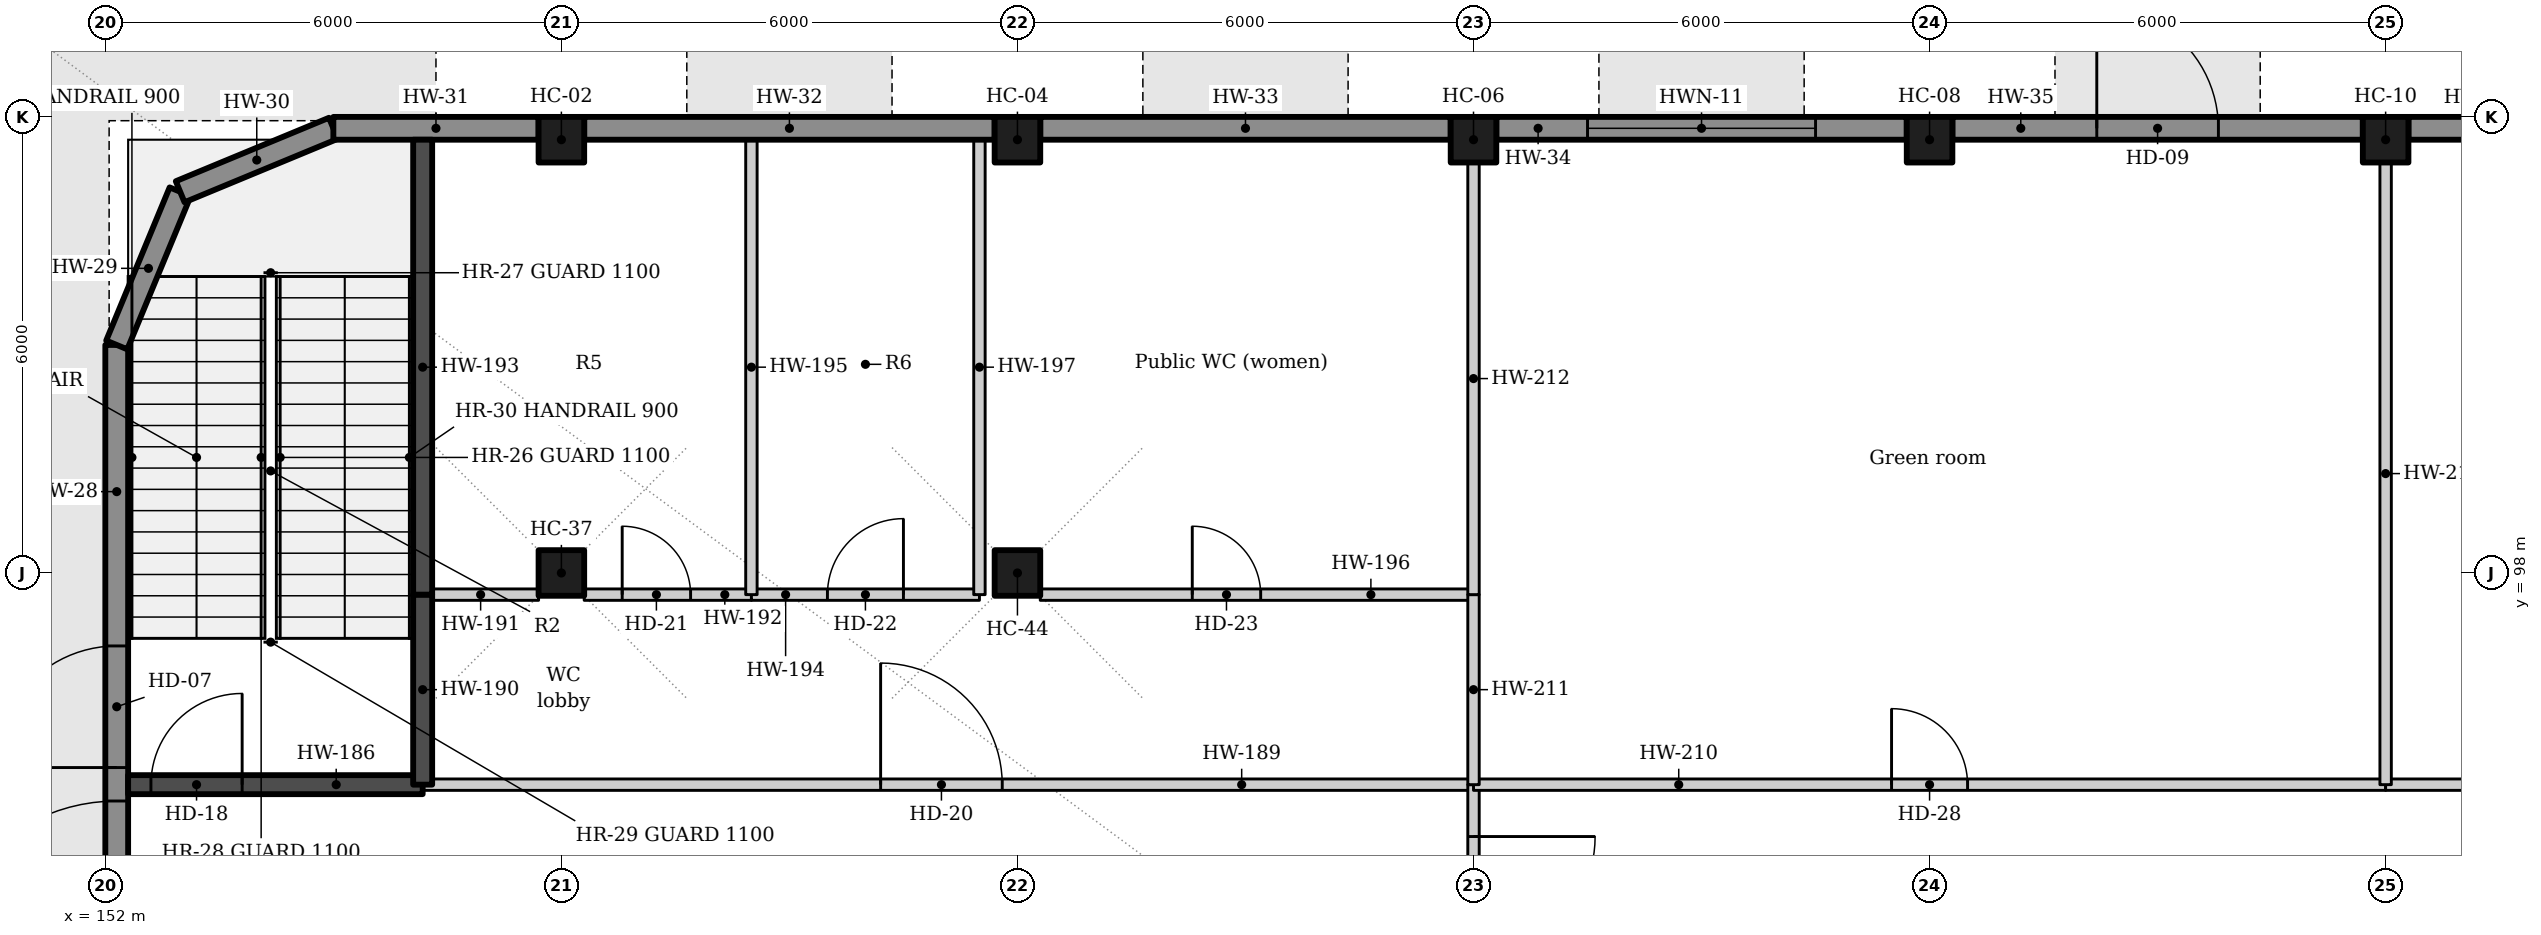
"""IFC4 building model, lengths in metres.
Left out: names, types, materials, properties, quantities, classifications, styles, units other than length and angle.
Written with IfcOpenShell. Run it as: python <this file> out.ifc"""

import sys

from ifc_helpers import new_model, si_unit, direction, frame, frame_2d, origin, origin_2d, place, context, subcontext, project, spatial, rectangle, extrude, element, fill, save


model = new_model("IFC4")
c1 = context("Model", 3, precision=1e-05, world=origin(), true_north=direction((0.0, 1.0)))
c2 = subcontext(c1, "Body", "Model", "MODEL_VIEW")
j1 = project(units=[si_unit("LENGTHUNIT", "METRE"), si_unit("PLANEANGLEUNIT", "RADIAN")], contexts=[c1])
p1 = place(None, origin())
s1 = spatial("IfcSite", under=j1, at=p1, CompositionType="ELEMENT")
p2 = place(p1, origin())
s2 = spatial("IfcBuilding", under=s1, at=p2, CompositionType="ELEMENT")
p3 = place(p2, origin())
s3 = spatial("IfcBuildingStorey", under=s2, at=p3, CompositionType="ELEMENT", Elevation=0.0)
for number, where, z_axis, x_axis in (
    (1, (158.0, 103.7, 0.0), (0.0, 0.0, 1.0), (1.0, 0.0, 0.0)),
    (2, (164.0, 103.7, 0.0), (0.0, 0.0, 1.0), (1.0, 0.0, 0.0)),
    (3, (170.0, 103.7, 0.0), (0.0, 0.0, 1.0), (1.0, 0.0, 0.0)),
    (4, (176.0, 103.7, 0.0), (0.0, 0.0, 1.0), (1.0, 0.0, 0.0)),
    (5, (182.0, 103.7, 0.0), (0.0, 0.0, 1.0), (1.0, 0.0, 0.0)),
    (6, (158.0, 98.0, 0.0), (0.0, 0.0, 1.0), (1.0, 0.0, 0.0)),
    (7, (164.0, 98.0, 0.0), (0.0, 0.0, 1.0), (1.0, 0.0, 0.0)),
):
    element("IfcColumn", number, at=place(p3, frame(where, z_axis=z_axis, x_axis=x_axis)), inside=s3, PredefinedType="COLUMN", context=c2, shape_type="SweptSolid", body=[
        extrude(rectangle(XDim=0.6, YDim=0.6, at=origin_2d()), origin(), (0.0, 0.0, 1.0), 6.6),
    ])
p4 = place(p3, frame((152.15, 92.3, 0.0), z_axis=(0.0, 0.0, 1.0), x_axis=(0.0, 1.0, 0.0)))
e8 = element("IfcWall", 8, at=p4, inside=s3, PredefinedType="SOLIDWALL", context=c2, shape_type="SweptSolid", body=[
    extrude(rectangle(XDim=8.7, YDim=0.3, at=frame_2d((4.35, 0.0))), origin(), (0.0, 0.0, 1.0), 6.6),
])
p5 = place(p4, frame((3.14, 0.0, 0.0)))
e9 = element("IfcOpeningElement", 9, at=p5, cuts=e8, PredefinedType="OPENING", context=c2, shape_type="SweptSolid", body=[
    extrude(rectangle(XDim=1.6, YDim=2.4, at=frame_2d((0.8, 1.2))), frame((0.0, 0.16, 0.0), z_axis=(0.0, -1.0, 0.0), x_axis=(1.0, 0.0, 0.0)), (0.0, 0.0, 1.0), 0.32),
])
p6 = place(p4, frame((0.3, 0.0, 0.0)))
e10 = element("IfcOpeningElement", 10, at=p6, cuts=e8, PredefinedType="OPENING", context=c2, shape_type="SweptSolid", body=[
    extrude(rectangle(XDim=2.4, YDim=2.5, at=frame_2d((1.2, 1.25))), frame((0.0, 0.16, 0.0), z_axis=(0.0, -1.0, 0.0), x_axis=(1.0, 0.0, 0.0)), (0.0, 0.0, 1.0), 0.32),
])
for number, where, z_axis, x_axis in (
    (11, (152.15, 101.0, 0.0), (0.0, 0.0, 1.0), (0.383, 0.924, 0.0)),
    (12, (152.985, 103.015, 0.0), (0.0, 0.0, 1.0), (0.924, 0.383, 0.0)),
):
    element("IfcWall", number, at=place(p3, frame(where, z_axis=z_axis, x_axis=x_axis)), inside=s3, PredefinedType="SOLIDWALL", context=c2, shape_type="SweptSolid", body=[
        extrude(rectangle(XDim=2.181, YDim=0.3, at=frame_2d((1.091, 0.0))), origin(), (0.0, 0.0, 1.0), 6.6),
    ])
p7 = place(p3, frame((155.0, 103.85, 0.0), z_axis=(0.0, 0.0, 1.0), x_axis=(1.0, 0.0, 0.0)))
e13 = element("IfcWall", 13, at=p7, inside=s3, PredefinedType="SOLIDWALL", context=c2, shape_type="SweptSolid", body=[
    extrude(rectangle(XDim=2.7, YDim=0.3, at=frame_2d((1.35, 0.0))), origin(), (0.0, 0.0, 1.0), 6.6),
])
for number, where, z_axis, x_axis in (
    (14, (158.3, 103.85, 0.0), (0.0, 0.0, 1.0), (1.0, 0.0, 0.0)),
    (15, (164.3, 103.85, 0.0), (0.0, 0.0, 1.0), (1.0, 0.0, 0.0)),
):
    element("IfcWall", number, at=place(p3, frame(where, z_axis=z_axis, x_axis=x_axis)), inside=s3, PredefinedType="SOLIDWALL", context=c2, shape_type="SweptSolid", body=[
        extrude(rectangle(XDim=5.4, YDim=0.3, at=frame_2d((2.7, 0.0))), origin(), (0.0, 0.0, 1.0), 6.6),
    ])
p8 = place(p3, frame((170.3, 103.85, 0.0), z_axis=(0.0, 0.0, 1.0), x_axis=(1.0, 0.0, 0.0)))
e16 = element("IfcWall", 16, at=p8, inside=s3, PredefinedType="SOLIDWALL", context=c2, shape_type="SweptSolid", body=[
    extrude(rectangle(XDim=5.4, YDim=0.3, at=frame_2d((2.7, 0.0))), origin(), (0.0, 0.0, 1.0), 6.6),
])
p9 = place(p8, frame((1.2, 0.0, 0.9)))
e17 = element("IfcOpeningElement", 17, at=p9, cuts=e16, PredefinedType="OPENING", context=c2, shape_type="SweptSolid", body=[
    extrude(rectangle(XDim=3.0, YDim=1.8, at=frame_2d((1.5, 0.9))), frame((0.0, 0.16, 0.0), z_axis=(0.0, -1.0, 0.0), x_axis=(1.0, 0.0, 0.0)), (0.0, 0.0, 1.0), 0.32),
])
p10 = place(p3, frame((176.3, 103.85, 0.0), z_axis=(0.0, 0.0, 1.0), x_axis=(1.0, 0.0, 0.0)))
e18 = element("IfcWall", 18, at=p10, inside=s3, PredefinedType="SOLIDWALL", context=c2, shape_type="SweptSolid", body=[
    extrude(rectangle(XDim=5.4, YDim=0.3, at=frame_2d((2.7, 0.0))), origin(), (0.0, 0.0, 1.0), 6.6),
])
p11 = place(p10, frame((1.9, 0.0, 0.0)))
e19 = element("IfcOpeningElement", 19, at=p11, cuts=e18, PredefinedType="OPENING", context=c2, shape_type="SweptSolid", body=[
    extrude(rectangle(XDim=1.6, YDim=2.4, at=frame_2d((0.8, 1.2))), frame((0.0, 0.16, 0.0), z_axis=(0.0, -1.0, 0.0), x_axis=(1.0, 0.0, 0.0)), (0.0, 0.0, 1.0), 0.32),
])
p12 = place(p3, frame((182.3, 103.85, 0.0), z_axis=(0.0, 0.0, 1.0), x_axis=(1.0, 0.0, 0.0)))
e20 = element("IfcWall", 20, at=p12, inside=s3, PredefinedType="SOLIDWALL", context=c2, shape_type="SweptSolid", body=[
    extrude(rectangle(XDim=5.4, YDim=0.3, at=frame_2d((2.7, 0.0))), origin(), (0.0, 0.0, 1.0), 6.6),
])
p13 = place(p12, frame((1.9, 0.0, 0.0)))
e21 = element("IfcOpeningElement", 21, at=p13, cuts=e20, PredefinedType="OPENING", context=c2, shape_type="SweptSolid", body=[
    extrude(rectangle(XDim=1.6, YDim=2.4, at=frame_2d((0.8, 1.2))), frame((0.0, 0.16, 0.0), z_axis=(0.0, -1.0, 0.0), x_axis=(1.0, 0.0, 0.0)), (0.0, 0.0, 1.0), 0.32),
])
p14 = place(p3, frame((152.3, 95.215, 0.0), z_axis=(0.0, 0.0, 1.0), x_axis=(1.0, 0.0, 0.0)))
e22 = element("IfcWall", 22, at=p14, inside=s3, PredefinedType="SOLIDWALL", context=c2, shape_type="SweptSolid", body=[
    extrude(rectangle(XDim=3.875, YDim=0.25, at=frame_2d((1.938, 0.0))), origin(), (0.0, 0.0, 1.0), 6.6),
])
p15 = place(p14, frame((0.3, 0.0, 0.0)))
e23 = element("IfcOpeningElement", 23, at=p15, cuts=e22, PredefinedType="OPENING", context=c2, shape_type="SweptSolid", body=[
    extrude(rectangle(XDim=1.2, YDim=2.1, at=frame_2d((0.6, 1.05))), frame((0.0, 0.135, 0.0), z_axis=(0.0, -1.0, 0.0), x_axis=(1.0, 0.0, 0.0)), (0.0, 0.0, 1.0), 0.27),
])
p16 = place(p3, frame((156.175, 95.215, 0.0), z_axis=(0.0, 0.0, 1.0), x_axis=(1.0, 0.0, 0.0)))
e24 = element("IfcWall", 24, at=p16, inside=s3, PredefinedType="PARTITIONING", context=c2, shape_type="SweptSolid", body=[
    extrude(rectangle(XDim=13.825, YDim=0.15, at=frame_2d((6.913, 0.0))), origin(), (0.0, 0.0, 1.0), 6.25),
])
p17 = place(p16, frame((6.025, 0.0, 0.0)))
e25 = element("IfcOpeningElement", 25, at=p17, cuts=e24, PredefinedType="OPENING", context=c2, shape_type="SweptSolid", body=[
    extrude(rectangle(XDim=1.6, YDim=2.1, at=frame_2d((0.8, 1.05))), frame((0.0, 0.085, 0.0), z_axis=(0.0, -1.0, 0.0), x_axis=(1.0, 0.0, 0.0)), (0.0, 0.0, 1.0), 0.17),
])
p18 = place(p3, frame((156.175, 97.715, 0.0), z_axis=(0.0, 0.0, 1.0), x_axis=(0.0, -1.0, 0.0)))
e26 = element("IfcWall", 26, at=p18, inside=s3, PredefinedType="SOLIDWALL", context=c2, shape_type="SweptSolid", body=[
    extrude(rectangle(XDim=2.5, YDim=0.25, at=frame_2d((1.25, 0.0))), origin(), (0.0, 0.0, 1.0), 6.6),
])
p19 = place(p3, frame((156.175, 97.715, 0.0), z_axis=(0.0, 0.0, 1.0), x_axis=(1.0, 0.0, 0.0)))
e27 = element("IfcWall", 27, at=p19, inside=s3, PredefinedType="PLUMBINGWALL", context=c2, shape_type="SweptSolid", body=[
    extrude(rectangle(XDim=1.525, YDim=0.15, at=frame_2d((0.762, 0.0))), origin(), (0.0, 0.0, 1.0), 6.25),
])
p20 = place(p3, frame((158.3, 97.715, 0.0), z_axis=(0.0, 0.0, 1.0), x_axis=(1.0, 0.0, 0.0)))
e28 = element("IfcWall", 28, at=p20, inside=s3, PredefinedType="PLUMBINGWALL", context=c2, shape_type="SweptSolid", body=[
    extrude(rectangle(XDim=2.2, YDim=0.15, at=frame_2d((1.1, 0.0))), origin(), (0.0, 0.0, 1.0), 6.25),
])
p21 = place(p20, frame((0.5, 0.0, 0.0)))
e29 = element("IfcOpeningElement", 29, at=p21, cuts=e28, PredefinedType="OPENING", context=c2, shape_type="SweptSolid", body=[
    extrude(rectangle(XDim=0.9, YDim=2.1, at=frame_2d((0.45, 1.05))), frame((0.0, 0.085, 0.0), z_axis=(0.0, -1.0, 0.0), x_axis=(1.0, 0.0, 0.0)), (0.0, 0.0, 1.0), 0.17),
])
p22 = place(p3, frame((156.175, 103.7, 0.0), z_axis=(0.0, 0.0, 1.0), x_axis=(0.0, -1.0, 0.0)))
e30 = element("IfcWall", 30, at=p22, inside=s3, PredefinedType="SOLIDWALL", context=c2, shape_type="SweptSolid", body=[
    extrude(rectangle(XDim=5.985, YDim=0.25, at=frame_2d((2.992, 0.0))), origin(), (0.0, 0.0, 1.0), 6.6),
])
p23 = place(p3, frame((160.5, 97.715, 0.0), z_axis=(0.0, 0.0, 1.0), x_axis=(1.0, 0.0, 0.0)))
e31 = element("IfcWall", 31, at=p23, inside=s3, PredefinedType="PLUMBINGWALL", context=c2, shape_type="SweptSolid", body=[
    extrude(rectangle(XDim=3.0, YDim=0.15, at=frame_2d((1.5, 0.0))), origin(), (0.0, 0.0, 1.0), 6.25),
])
p24 = place(p23, frame((1.0, 0.0, 0.0)))
e32 = element("IfcOpeningElement", 32, at=p24, cuts=e31, PredefinedType="OPENING", context=c2, shape_type="SweptSolid", body=[
    extrude(rectangle(XDim=1.0, YDim=2.1, at=frame_2d((0.5, 1.05))), frame((0.0, 0.085, 0.0), z_axis=(0.0, -1.0, 0.0), x_axis=(1.0, 0.0, 0.0)), (0.0, 0.0, 1.0), 0.17),
])
p25 = place(p3, frame((160.5, 103.7, 0.0), z_axis=(0.0, 0.0, 1.0), x_axis=(0.0, -1.0, 0.0)))
e33 = element("IfcWall", 33, at=p25, inside=s3, PredefinedType="PLUMBINGWALL", context=c2, shape_type="SweptSolid", body=[
    extrude(rectangle(XDim=5.985, YDim=0.15, at=frame_2d((2.992, 0.0))), origin(), (0.0, 0.0, 1.0), 6.25),
])
p26 = place(p3, frame((164.3, 97.715, 0.0), z_axis=(0.0, 0.0, 1.0), x_axis=(1.0, 0.0, 0.0)))
e34 = element("IfcWall", 34, at=p26, inside=s3, PredefinedType="PLUMBINGWALL", context=c2, shape_type="SweptSolid", body=[
    extrude(rectangle(XDim=5.7, YDim=0.15, at=frame_2d((2.85, 0.0))), origin(), (0.0, 0.0, 1.0), 6.25),
])
p27 = place(p26, frame((2.0, 0.0, 0.0)))
e35 = element("IfcOpeningElement", 35, at=p27, cuts=e34, PredefinedType="OPENING", context=c2, shape_type="SweptSolid", body=[
    extrude(rectangle(XDim=0.9, YDim=2.1, at=frame_2d((0.45, 1.05))), frame((0.0, 0.085, 0.0), z_axis=(0.0, -1.0, 0.0), x_axis=(1.0, 0.0, 0.0)), (0.0, 0.0, 1.0), 0.17),
])
p28 = place(p3, frame((163.5, 103.7, 0.0), z_axis=(0.0, 0.0, 1.0), x_axis=(0.0, -1.0, 0.0)))
e36 = element("IfcWall", 36, at=p28, inside=s3, PredefinedType="PLUMBINGWALL", context=c2, shape_type="SweptSolid", body=[
    extrude(rectangle(XDim=5.985, YDim=0.15, at=frame_2d((2.992, 0.0))), origin(), (0.0, 0.0, 1.0), 6.25),
])
p29 = place(p3, frame((170.0, 95.215, 0.0), z_axis=(0.0, 0.0, 1.0), x_axis=(0.0, -1.0, 0.0)))
e37 = element("IfcWall", 37, at=p29, inside=s3, PredefinedType="PARTITIONING", context=c2, shape_type="SweptSolid", body=[
    extrude(rectangle(XDim=2.965, YDim=0.15, at=frame_2d((1.482, 0.0))), origin(), (0.0, 0.0, 1.0), 6.25),
])
p30 = place(p29, frame((0.683, 0.0, 0.0)))
e38 = element("IfcOpeningElement", 38, at=p30, cuts=e37, PredefinedType="OPENING", context=c2, shape_type="SweptSolid", body=[
    extrude(rectangle(XDim=1.6, YDim=2.1, at=frame_2d((0.8, 1.05))), frame((0.0, 0.085, 0.0), z_axis=(0.0, -1.0, 0.0), x_axis=(1.0, 0.0, 0.0)), (0.0, 0.0, 1.0), 0.17),
])
p31 = place(p3, frame((170.0, 95.215, 0.0), z_axis=(0.0, 0.0, 1.0), x_axis=(1.0, 0.0, 0.0)))
e39 = element("IfcWall", 39, at=p31, inside=s3, PredefinedType="PARTITIONING", context=c2, shape_type="SweptSolid", body=[
    extrude(rectangle(XDim=12.0, YDim=0.15, at=frame_2d((6.0, 0.0))), origin(), (0.0, 0.0, 1.0), 6.25),
])
p32 = place(p31, frame((5.5, 0.0, 0.0)))
e40 = element("IfcOpeningElement", 40, at=p32, cuts=e39, PredefinedType="OPENING", context=c2, shape_type="SweptSolid", body=[
    extrude(rectangle(XDim=1.0, YDim=2.1, at=frame_2d((0.5, 1.05))), frame((0.0, 0.085, 0.0), z_axis=(0.0, -1.0, 0.0), x_axis=(1.0, 0.0, 0.0)), (0.0, 0.0, 1.0), 0.17),
])
p33 = place(p3, frame((170.0, 97.715, 0.0), z_axis=(0.0, 0.0, 1.0), x_axis=(0.0, -1.0, 0.0)))
e41 = element("IfcWall", 41, at=p33, inside=s3, PredefinedType="PARTITIONING", context=c2, shape_type="SweptSolid", body=[
    extrude(rectangle(XDim=2.5, YDim=0.15, at=frame_2d((1.25, 0.0))), origin(), (0.0, 0.0, 1.0), 6.25),
])
p34 = place(p3, frame((170.0, 103.4, 0.0), z_axis=(0.0, 0.0, 1.0), x_axis=(0.0, -1.0, 0.0)))
e42 = element("IfcWall", 42, at=p34, inside=s3, PredefinedType="PLUMBINGWALL", context=c2, shape_type="SweptSolid", body=[
    extrude(rectangle(XDim=5.685, YDim=0.15, at=frame_2d((2.842, 0.0))), origin(), (0.0, 0.0, 1.0), 6.25),
])
p35 = place(p3, frame((182.0, 95.215, 0.0), z_axis=(0.0, 0.0, 1.0), x_axis=(1.0, 0.0, 0.0)))
e43 = element("IfcWall", 43, at=p35, inside=s3, PredefinedType="PARTITIONING", context=c2, shape_type="SweptSolid", body=[
    extrude(rectangle(XDim=12.0, YDim=0.15, at=frame_2d((6.0, 0.0))), origin(), (0.0, 0.0, 1.0), 6.25),
])
p36 = place(p35, frame((5.5, 0.0, 0.0)))
e44 = element("IfcOpeningElement", 44, at=p36, cuts=e43, PredefinedType="OPENING", context=c2, shape_type="SweptSolid", body=[
    extrude(rectangle(XDim=1.0, YDim=2.1, at=frame_2d((0.5, 1.05))), frame((0.0, 0.085, 0.0), z_axis=(0.0, -1.0, 0.0), x_axis=(1.0, 0.0, 0.0)), (0.0, 0.0, 1.0), 0.17),
])
p37 = place(p3, frame((182.0, 103.4, 0.0), z_axis=(0.0, 0.0, 1.0), x_axis=(0.0, -1.0, 0.0)))
e45 = element("IfcWall", 45, at=p37, inside=s3, PredefinedType="PARTITIONING", context=c2, shape_type="SweptSolid", body=[
    extrude(rectangle(XDim=8.185, YDim=0.15, at=frame_2d((4.092, 0.0))), origin(), (0.0, 0.0, 1.0), 6.25),
])
p38 = place(p5, origin())
e46 = element("IfcDoor", 46, at=p38, inside=s3, OperationType="SINGLE_SWING_LEFT", PredefinedType="DOOR", context=c2, shape_type="SweptSolid", body=[
    extrude(rectangle(XDim=1.6, YDim=2.4, at=frame_2d((0.8, 1.2))), frame((0.0, 0.025, 0.0), z_axis=(0.0, -1.0, 0.0), x_axis=(1.0, 0.0, 0.0)), (0.0, 0.0, 1.0), 0.05),
])
fill(e9, e46)
p39 = place(p6, origin())
e47 = element("IfcDoor", 47, at=p39, inside=s3, OperationType="SINGLE_SWING_LEFT", PredefinedType="DOOR", context=c2, shape_type="SweptSolid", body=[
    extrude(rectangle(XDim=2.4, YDim=2.5, at=frame_2d((1.2, 1.25))), frame((0.0, 0.025, 0.0), z_axis=(0.0, -1.0, 0.0), x_axis=(1.0, 0.0, 0.0)), (0.0, 0.0, 1.0), 0.05),
])
fill(e10, e47)
p40 = place(p9, origin())
e48 = element("IfcWindow", 48, at=p40, inside=s3, PartitioningType="SINGLE_PANEL", PredefinedType="WINDOW", context=c2, shape_type="SweptSolid", body=[
    extrude(rectangle(XDim=3.0, YDim=1.8, at=frame_2d((1.5, 0.9))), frame((0.0, 0.03, 0.0), z_axis=(0.0, -1.0, 0.0), x_axis=(1.0, 0.0, 0.0)), (0.0, 0.0, 1.0), 0.06),
])
fill(e17, e48)
p41 = place(p11, origin())
e49 = element("IfcDoor", 49, at=p41, inside=s3, OperationType="SINGLE_SWING_LEFT", PredefinedType="DOOR", context=c2, shape_type="SweptSolid", body=[
    extrude(rectangle(XDim=1.6, YDim=2.4, at=frame_2d((0.8, 1.2))), frame((0.0, 0.025, 0.0), z_axis=(0.0, -1.0, 0.0), x_axis=(1.0, 0.0, 0.0)), (0.0, 0.0, 1.0), 0.05),
])
fill(e19, e49)
p42 = place(p15, origin())
e50 = element("IfcDoor", 50, at=p42, inside=s3, OperationType="SINGLE_SWING_RIGHT", PredefinedType="DOOR", context=c2, shape_type="SweptSolid", body=[
    extrude(rectangle(XDim=1.2, YDim=2.1, at=frame_2d((0.6, 1.05))), frame((0.0, 0.025, 0.0), z_axis=(0.0, -1.0, 0.0), x_axis=(1.0, 0.0, 0.0)), (0.0, 0.0, 1.0), 0.05),
])
fill(e23, e50)
p43 = place(p17, origin())
e51 = element("IfcDoor", 51, at=p43, inside=s3, OperationType="DOUBLE_DOOR_SINGLE_SWING", PredefinedType="DOOR", context=c2, shape_type="SweptSolid", body=[
    extrude(rectangle(XDim=1.6, YDim=2.1, at=frame_2d((0.8, 1.05))), frame((0.0, 0.025, 0.0), z_axis=(0.0, -1.0, 0.0), x_axis=(1.0, 0.0, 0.0)), (0.0, 0.0, 1.0), 0.05),
])
fill(e25, e51)
p44 = place(p21, origin())
e52 = element("IfcDoor", 52, at=p44, inside=s3, OperationType="SINGLE_SWING_LEFT", PredefinedType="DOOR", context=c2, shape_type="SweptSolid", body=[
    extrude(rectangle(XDim=0.9, YDim=2.1, at=frame_2d((0.45, 1.05))), frame((0.0, 0.025, 0.0), z_axis=(0.0, -1.0, 0.0), x_axis=(1.0, 0.0, 0.0)), (0.0, 0.0, 1.0), 0.05),
])
fill(e29, e52)
p45 = place(p24, origin())
e53 = element("IfcDoor", 53, at=p45, inside=s3, OperationType="SINGLE_SWING_RIGHT", PredefinedType="DOOR", context=c2, shape_type="SweptSolid", body=[
    extrude(rectangle(XDim=1.0, YDim=2.1, at=frame_2d((0.5, 1.05))), frame((0.0, 0.025, 0.0), z_axis=(0.0, -1.0, 0.0), x_axis=(1.0, 0.0, 0.0)), (0.0, 0.0, 1.0), 0.05),
])
fill(e32, e53)
p46 = place(p27, origin())
e54 = element("IfcDoor", 54, at=p46, inside=s3, OperationType="SINGLE_SWING_LEFT", PredefinedType="DOOR", context=c2, shape_type="SweptSolid", body=[
    extrude(rectangle(XDim=0.9, YDim=2.1, at=frame_2d((0.45, 1.05))), frame((0.0, 0.025, 0.0), z_axis=(0.0, -1.0, 0.0), x_axis=(1.0, 0.0, 0.0)), (0.0, 0.0, 1.0), 0.05),
])
fill(e35, e54)
p47 = place(p30, origin())
e55 = element("IfcDoor", 55, at=p47, inside=s3, OperationType="DOUBLE_DOOR_SINGLE_SWING", PredefinedType="DOOR", context=c2, shape_type="SweptSolid", body=[
    extrude(rectangle(XDim=1.6, YDim=2.1, at=frame_2d((0.8, 1.05))), frame((0.0, 0.025, 0.0), z_axis=(0.0, -1.0, 0.0), x_axis=(1.0, 0.0, 0.0)), (0.0, 0.0, 1.0), 0.05),
])
fill(e38, e55)
p48 = place(p32, origin())
e56 = element("IfcDoor", 56, at=p48, inside=s3, OperationType="SINGLE_SWING_LEFT", PredefinedType="DOOR", context=c2, shape_type="SweptSolid", body=[
    extrude(rectangle(XDim=1.0, YDim=2.1, at=frame_2d((0.5, 1.05))), frame((0.0, 0.025, 0.0), z_axis=(0.0, -1.0, 0.0), x_axis=(1.0, 0.0, 0.0)), (0.0, 0.0, 1.0), 0.05),
])
fill(e40, e56)
save(model, sys.argv[1])
